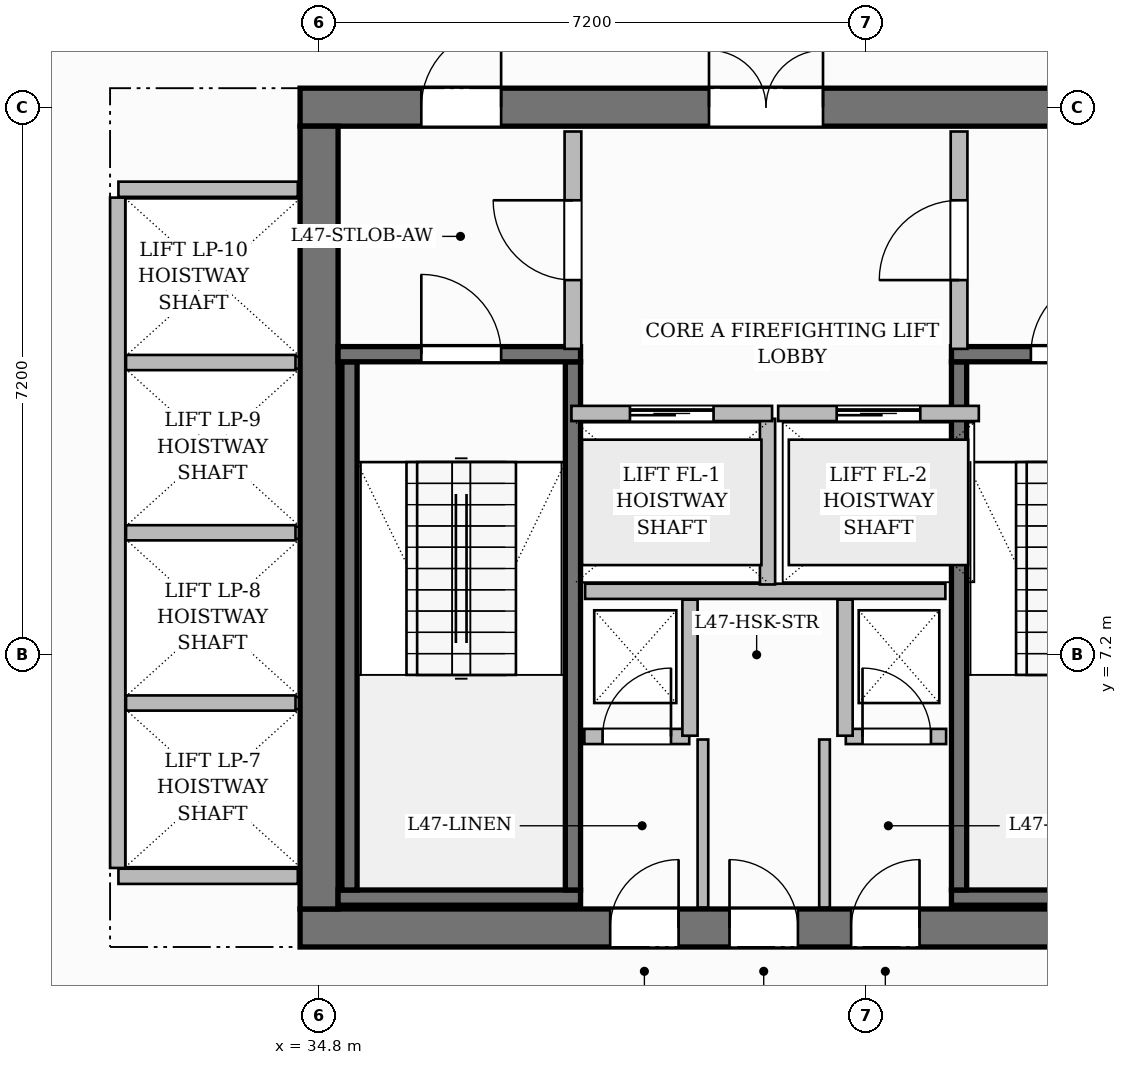
"""IFC4 building model, lengths in metres.
Left out: names, types, materials, properties, quantities, classifications, styles, units other than length and angle.
Written with IfcOpenShell. Run it as: python <this file> out.ifc"""

import sys

from ifc_helpers import new_model, si_unit, direction, frame, frame_2d, origin, place, context, subcontext, project, spatial, rectangle, extrude, source, transform, mapped, element, fill, save


model = new_model("IFC4")
c1 = context("Model", 3, precision=1e-05, world=origin(), true_north=direction((0.0, 1.0)))
c2 = subcontext(c1, "Body", "Model", "MODEL_VIEW")
j1 = project(units=[si_unit("LENGTHUNIT", "METRE"), si_unit("PLANEANGLEUNIT", "RADIAN")], contexts=[c1])
p1 = place(None, origin())
s1 = spatial("IfcSite", under=j1, at=p1, CompositionType="ELEMENT")
p2 = place(p1, origin())
s2 = spatial("IfcBuilding", under=s1, at=p2, CompositionType="ELEMENT")
p3 = place(p2, frame((0.0, 0.0, 188.8)))
s3 = spatial("IfcBuildingStorey", under=s2, at=p3, CompositionType="ELEMENT", Elevation=188.8)
p4 = place(p3, frame((34.55, 3.6, 0.0), z_axis=(0.0, 0.0, 1.0), x_axis=(1.0, 0.0, 0.0)))
e1 = element("IfcWall", 1, at=p4, inside=s3, PredefinedType="SHEAR", context=c2, shape_type="SweptSolid", body=[
    extrude(rectangle(XDim=15.5, YDim=0.5, at=frame_2d((7.75, 0.0))), origin(), (0.0, 0.0, 1.0), 3.85),
])
p5 = place(p4, frame((4.08, 0.0, 0.0)))
e2 = element("IfcOpeningElement", 2, at=p5, cuts=e1, PredefinedType="OPENING", context=c2, shape_type="SweptSolid", body=[
    extrude(rectangle(XDim=0.9, YDim=2.1, at=frame_2d((0.45, 1.05))), frame((0.0, 0.26, 0.0), z_axis=(0.0, -1.0, 0.0), x_axis=(1.0, 0.0, 0.0)), (0.0, 0.0, 1.0), 0.52),
])
p6 = place(p4, frame((5.65, 0.0, 0.0)))
e3 = element("IfcOpeningElement", 3, at=p6, cuts=e1, PredefinedType="OPENING", context=c2, shape_type="SweptSolid", body=[
    extrude(rectangle(XDim=0.9, YDim=2.1, at=frame_2d((0.45, 1.05))), frame((0.0, 0.26, 0.0), z_axis=(0.0, -1.0, 0.0), x_axis=(1.0, 0.0, 0.0)), (0.0, 0.0, 1.0), 0.52),
])
p7 = place(p4, frame((7.25, 0.0, 0.0)))
e4 = element("IfcOpeningElement", 4, at=p7, cuts=e1, PredefinedType="OPENING", context=c2, shape_type="SweptSolid", body=[
    extrude(rectangle(XDim=0.9, YDim=2.1, at=frame_2d((0.45, 1.05))), frame((0.0, 0.26, 0.0), z_axis=(0.0, -1.0, 0.0), x_axis=(1.0, 0.0, 0.0)), (0.0, 0.0, 1.0), 0.52),
])
p8 = place(p3, frame((34.55, 14.4, 0.0), z_axis=(0.0, 0.0, 1.0), x_axis=(1.0, 0.0, 0.0)))
e5 = element("IfcWall", 5, at=p8, inside=s3, PredefinedType="SHEAR", context=c2, shape_type="SweptSolid", body=[
    extrude(rectangle(XDim=15.5, YDim=0.5, at=frame_2d((7.75, 0.0))), origin(), (0.0, 0.0, 1.0), 3.85),
])
p9 = place(p8, frame((5.38, 0.0, 0.0)))
e6 = element("IfcOpeningElement", 6, at=p9, cuts=e5, PredefinedType="OPENING", context=c2, shape_type="SweptSolid", body=[
    extrude(rectangle(XDim=1.5, YDim=2.2, at=frame_2d((0.75, 1.1))), frame((0.0, 0.26, 0.0), z_axis=(0.0, -1.0, 0.0), x_axis=(1.0, 0.0, 0.0)), (0.0, 0.0, 1.0), 0.52),
])
p10 = place(p8, frame((1.595, 0.0, 0.0)))
e7 = element("IfcOpeningElement", 7, at=p10, cuts=e5, PredefinedType="OPENING", context=c2, shape_type="SweptSolid", body=[
    extrude(rectangle(XDim=1.05, YDim=2.15, at=frame_2d((0.525, 1.075))), frame((0.0, 0.26, 0.0), z_axis=(0.0, -1.0, 0.0), x_axis=(1.0, 0.0, 0.0)), (0.0, 0.0, 1.0), 0.52),
])
p11 = place(p8, frame((11.225, 0.0, 0.0)))
e8 = element("IfcOpeningElement", 8, at=p11, cuts=e5, PredefinedType="OPENING", context=c2, shape_type="SweptSolid", body=[
    extrude(rectangle(XDim=1.05, YDim=2.15, at=frame_2d((0.525, 1.075))), frame((0.0, 0.26, 0.0), z_axis=(0.0, -1.0, 0.0), x_axis=(1.0, 0.0, 0.0)), (0.0, 0.0, 1.0), 0.52),
])
p12 = place(p3, frame((34.8, 3.85, 0.0), z_axis=(0.0, 0.0, 1.0), x_axis=(0.0, 1.0, 0.0)))
e9 = element("IfcWall", 9, at=p12, inside=s3, PredefinedType="SHEAR", context=c2, shape_type="SweptSolid", body=[
    extrude(rectangle(XDim=10.3, YDim=0.5, at=frame_2d((5.15, 0.0))), origin(), (0.0, 0.0, 1.0), 3.85),
])
p13 = place(p3, frame((35.05, 4.0, 0.0), z_axis=(0.0, 0.0, 1.0), x_axis=(1.0, 0.0, 0.0)))
e10 = element("IfcWall", 10, at=p13, inside=s3, PredefinedType="SHEAR", context=c2, shape_type="SweptSolid", body=[
    extrude(rectangle(XDim=3.19, YDim=0.2, at=frame_2d((1.595, 0.0))), origin(), (0.0, 0.0, 1.0), 3.85),
])
for number, where, z_axis, x_axis in (
    (11, (35.2, 4.1, 0.0), (0.0, 0.0, 1.0), (0.0, 1.0, 0.0)),
    (12, (38.14, 4.1, 0.0), (0.0, 0.0, 1.0), (0.0, 1.0, 0.0)),
):
    element("IfcWall", number, at=place(p3, frame(where, z_axis=z_axis, x_axis=x_axis)), inside=s3, PredefinedType="SHEAR", context=c2, shape_type="SweptSolid", body=[
        extrude(rectangle(XDim=6.95, YDim=0.2, at=frame_2d((3.475, 0.0))), origin(), (0.0, 0.0, 1.0), 3.85),
    ])
p14 = place(p3, frame((35.05, 11.15, 0.0), z_axis=(0.0, 0.0, 1.0), x_axis=(1.0, 0.0, 0.0)))
e13 = element("IfcWall", 13, at=p14, inside=s3, PredefinedType="SHEAR", context=c2, shape_type="SweptSolid", body=[
    extrude(rectangle(XDim=3.19, YDim=0.2, at=frame_2d((1.595, 0.0))), origin(), (0.0, 0.0, 1.0), 3.85),
])
p15 = place(p14, frame((1.095, 0.0, 0.0)))
e14 = element("IfcOpeningElement", 14, at=p15, cuts=e13, PredefinedType="OPENING", context=c2, shape_type="SweptSolid", body=[
    extrude(rectangle(XDim=1.05, YDim=2.2, at=frame_2d((0.525, 1.1))), frame((0.0, 0.11, 0.0), z_axis=(0.0, -1.0, 0.0), x_axis=(1.0, 0.0, 0.0)), (0.0, 0.0, 1.0), 0.22),
])
p16 = place(p3, frame((43.12, 4.0, 0.0), z_axis=(0.0, 0.0, 1.0), x_axis=(1.0, 0.0, 0.0)))
e15 = element("IfcWall", 15, at=p16, inside=s3, PredefinedType="SHEAR", context=c2, shape_type="SweptSolid", body=[
    extrude(rectangle(XDim=6.43, YDim=0.2, at=frame_2d((3.215, 0.0))), origin(), (0.0, 0.0, 1.0), 3.85),
])
p17 = place(p3, frame((43.22, 4.1, 0.0), z_axis=(0.0, 0.0, 1.0), x_axis=(0.0, 1.0, 0.0)))
e16 = element("IfcWall", 16, at=p17, inside=s3, PredefinedType="SHEAR", context=c2, shape_type="SweptSolid", body=[
    extrude(rectangle(XDim=6.95, YDim=0.2, at=frame_2d((3.475, 0.0))), origin(), (0.0, 0.0, 1.0), 3.85),
])
p18 = place(p3, frame((43.12, 11.15, 0.0), z_axis=(0.0, 0.0, 1.0), x_axis=(1.0, 0.0, 0.0)))
e17 = element("IfcWall", 17, at=p18, inside=s3, PredefinedType="SHEAR", context=c2, shape_type="SweptSolid", body=[
    extrude(rectangle(XDim=6.43, YDim=0.2, at=frame_2d((3.215, 0.0))), origin(), (0.0, 0.0, 1.0), 3.85),
])
p19 = place(p18, frame((1.045, 0.0, 0.0)))
e18 = element("IfcOpeningElement", 18, at=p19, cuts=e17, PredefinedType="OPENING", context=c2, shape_type="SweptSolid", body=[
    extrude(rectangle(XDim=1.05, YDim=2.2, at=frame_2d((0.525, 1.1))), frame((0.0, 0.11, 0.0), z_axis=(0.0, -1.0, 0.0), x_axis=(1.0, 0.0, 0.0)), (0.0, 0.0, 1.0), 0.22),
])
p20 = place(p18, frame((4.125, 0.0, 0.0)))
e19 = element("IfcOpeningElement", 19, at=p20, cuts=e17, PredefinedType="OPENING", context=c2, shape_type="SweptSolid", body=[
    extrude(rectangle(XDim=1.05, YDim=2.2, at=frame_2d((0.525, 1.1))), frame((0.0, 0.11, 0.0), z_axis=(0.0, -1.0, 0.0), x_axis=(1.0, 0.0, 0.0)), (0.0, 0.0, 1.0), 0.22),
])
p21 = place(p3, frame((38.3, 8.03, 0.0), z_axis=(0.0, 0.0, 1.0), x_axis=(1.0, 0.0, 0.0)))
e20 = element("IfcWall", 20, at=p21, inside=s3, PredefinedType="PARTITIONING", context=c2, shape_type="SweptSolid", body=[
    extrude(rectangle(XDim=4.74, YDim=0.2, at=frame_2d((2.37, 0.0))), origin(), (0.0, 0.0, 1.0), 3.6),
])
p22 = place(p3, frame((40.7, 8.12, 0.0), z_axis=(0.0, 0.0, 1.0), x_axis=(0.0, 1.0, 0.0)))
e21 = element("IfcWall", 21, at=p22, inside=s3, PredefinedType="PARTITIONING", context=c2, shape_type="SweptSolid", body=[
    extrude(rectangle(XDim=2.18, YDim=0.2, at=frame_2d((1.09, 0.0))), origin(), (0.0, 0.0, 1.0), 3.6),
])
p23 = place(p3, frame((38.14, 11.22, 0.0), z_axis=(0.0, 0.0, 1.0), x_axis=(0.0, 1.0, 0.0)))
e22 = element("IfcWall", 22, at=p23, inside=s3, PredefinedType="PARTITIONING", context=c2, shape_type="SweptSolid", body=[
    extrude(rectangle(XDim=2.86, YDim=0.22, at=frame_2d((1.43, 0.0))), origin(), (0.0, 0.0, 1.0), 3.6),
])
p24 = place(p23, frame((0.905, 0.0, 0.0)))
e23 = element("IfcOpeningElement", 23, at=p24, cuts=e22, PredefinedType="OPENING", context=c2, shape_type="SweptSolid", body=[
    extrude(rectangle(XDim=1.05, YDim=2.15, at=frame_2d((0.525, 1.075))), frame((0.0, 0.12, 0.0), z_axis=(0.0, -1.0, 0.0), x_axis=(1.0, 0.0, 0.0)), (0.0, 0.0, 1.0), 0.24),
])
p25 = place(p3, frame((43.22, 11.22, 0.0), z_axis=(0.0, 0.0, 1.0), x_axis=(0.0, 1.0, 0.0)))
e24 = element("IfcWall", 24, at=p25, inside=s3, PredefinedType="PARTITIONING", context=c2, shape_type="SweptSolid", body=[
    extrude(rectangle(XDim=2.86, YDim=0.22, at=frame_2d((1.43, 0.0))), origin(), (0.0, 0.0, 1.0), 3.6),
])
p26 = place(p25, frame((0.905, 0.0, 0.0)))
e25 = element("IfcOpeningElement", 25, at=p26, cuts=e24, PredefinedType="OPENING", context=c2, shape_type="SweptSolid", body=[
    extrude(rectangle(XDim=1.05, YDim=2.15, at=frame_2d((0.525, 1.075))), frame((0.0, 0.12, 0.0), z_axis=(0.0, -1.0, 0.0), x_axis=(1.0, 0.0, 0.0)), (0.0, 0.0, 1.0), 0.24),
])
p27 = place(p3, frame((38.29, 6.12, 0.0), z_axis=(0.0, 0.0, 1.0), x_axis=(1.0, 0.0, 0.0)))
e26 = element("IfcWall", 26, at=p27, inside=s3, PredefinedType="PARTITIONING", context=c2, shape_type="SweptSolid", body=[
    extrude(rectangle(XDim=1.38, YDim=0.2, at=frame_2d((0.69, 0.0))), origin(), (0.0, 0.0, 1.0), 3.6),
])
p28 = place(p27, frame((0.24, 0.0, 0.0)))
e27 = element("IfcOpeningElement", 27, at=p28, cuts=e26, PredefinedType="OPENING", context=c2, shape_type="SweptSolid", body=[
    extrude(rectangle(XDim=0.9, YDim=2.1, at=frame_2d((0.45, 1.05))), frame((0.0, 0.11, 0.0), z_axis=(0.0, -1.0, 0.0), x_axis=(1.0, 0.0, 0.0)), (0.0, 0.0, 1.0), 0.22),
])
p29 = place(p3, frame((39.68, 6.13, 0.0), z_axis=(0.0, 0.0, 1.0), x_axis=(0.0, 1.0, 0.0)))
e28 = element("IfcWall", 28, at=p29, inside=s3, PredefinedType="PARTITIONING", context=c2, shape_type="SweptSolid", body=[
    extrude(rectangle(XDim=1.79, YDim=0.2, at=frame_2d((0.895, 0.0))), origin(), (0.0, 0.0, 1.0), 3.6),
])
p30 = place(p3, frame((41.73, 6.12, 0.0), z_axis=(0.0, 0.0, 1.0), x_axis=(1.0, 0.0, 0.0)))
e29 = element("IfcWall", 29, at=p30, inside=s3, PredefinedType="PARTITIONING", context=c2, shape_type="SweptSolid", body=[
    extrude(rectangle(XDim=1.32, YDim=0.2, at=frame_2d((0.66, 0.0))), origin(), (0.0, 0.0, 1.0), 3.6),
])
p31 = place(p30, frame((0.22, 0.0, 0.0)))
e30 = element("IfcOpeningElement", 30, at=p31, cuts=e29, PredefinedType="OPENING", context=c2, shape_type="SweptSolid", body=[
    extrude(rectangle(XDim=0.9, YDim=2.1, at=frame_2d((0.45, 1.05))), frame((0.0, 0.11, 0.0), z_axis=(0.0, -1.0, 0.0), x_axis=(1.0, 0.0, 0.0)), (0.0, 0.0, 1.0), 0.22),
])
p32 = place(p3, frame((41.72, 6.13, 0.0), z_axis=(0.0, 0.0, 1.0), x_axis=(0.0, 1.0, 0.0)))
e31 = element("IfcWall", 31, at=p32, inside=s3, PredefinedType="PARTITIONING", context=c2, shape_type="SweptSolid", body=[
    extrude(rectangle(XDim=1.79, YDim=0.2, at=frame_2d((0.895, 0.0))), origin(), (0.0, 0.0, 1.0), 3.6),
])
for number, where, z_axis, x_axis in (
    (32, (39.85, 3.87, 0.0), (0.0, 0.0, 1.0), (0.0, 1.0, 0.0)),
    (33, (41.45, 3.87, 0.0), (0.0, 0.0, 1.0), (0.0, 1.0, 0.0)),
):
    element("IfcWall", number, at=place(p3, frame(where, z_axis=z_axis, x_axis=x_axis)), inside=s3, PredefinedType="PARTITIONING", context=c2, shape_type="SweptSolid", body=[
        extrude(rectangle(XDim=2.21, YDim=0.14, at=frame_2d((1.105, 0.0))), origin(), (0.0, 0.0, 1.0), 3.6),
    ])
for number, where, z_axis, x_axis in (
    (34, (32.16, 4.28, 0.0), (0.0, 0.0, 1.0), (1.0, 0.0, 0.0)),
    (35, (32.16, 13.32, 0.0), (0.0, 0.0, 1.0), (1.0, 0.0, 0.0)),
):
    element("IfcWall", number, at=place(p3, frame(where, z_axis=z_axis, x_axis=x_axis)), inside=s3, PredefinedType="PARTITIONING", context=c2, shape_type="SweptSolid", body=[
        extrude(rectangle(XDim=2.36, YDim=0.2, at=frame_2d((1.18, 0.0))), origin(), (0.0, 0.0, 1.0), 3.6),
    ])
p33 = place(p3, frame((32.15, 4.39, 0.0), z_axis=(0.0, 0.0, 1.0), x_axis=(0.0, 1.0, 0.0)))
e36 = element("IfcWall", 36, at=p33, inside=s3, PredefinedType="PARTITIONING", context=c2, shape_type="SweptSolid", body=[
    extrude(rectangle(XDim=8.82, YDim=0.2, at=frame_2d((4.41, 0.0))), origin(), (0.0, 0.0, 1.0), 3.6),
])
for number, where, z_axis, x_axis in (
    (37, (32.26, 6.56, 0.0), (0.0, 0.0, 1.0), (1.0, 0.0, 0.0)),
    (38, (32.26, 8.8, 0.0), (0.0, 0.0, 1.0), (1.0, 0.0, 0.0)),
    (39, (32.26, 11.04, 0.0), (0.0, 0.0, 1.0), (1.0, 0.0, 0.0)),
):
    element("IfcWall", number, at=place(p3, frame(where, z_axis=z_axis, x_axis=x_axis)), inside=s3, PredefinedType="PARTITIONING", context=c2, shape_type="SweptSolid", body=[
        extrude(rectangle(XDim=2.23, YDim=0.2, at=frame_2d((1.115, 0.0))), origin(), (0.0, 0.0, 1.0), 3.6),
    ])
p34 = place(p3, frame((38.12, 10.37, 0.0), z_axis=(0.0, 0.0, 1.0), x_axis=(1.0, 0.0, 0.0)))
e40 = element("IfcWall", 40, at=p34, inside=s3, PredefinedType="PARTITIONING", context=c2, shape_type="SweptSolid", body=[
    extrude(rectangle(XDim=2.64, YDim=0.2, at=frame_2d((1.32, 0.0))), origin(), (0.0, 0.0, 1.0), 3.6),
])
p35 = place(p34, frame((0.77, 0.0, 0.0)))
e41 = element("IfcOpeningElement", 41, at=p35, cuts=e40, PredefinedType="OPENING", context=c2, shape_type="SweptSolid", body=[
    extrude(rectangle(XDim=1.1, YDim=2.2, at=frame_2d((0.55, 1.1))), frame((0.0, 0.11, 0.0), z_axis=(0.0, -1.0, 0.0), x_axis=(1.0, 0.0, 0.0)), (0.0, 0.0, 1.0), 0.22),
])
p36 = place(p3, frame((40.84, 10.37, 0.0), z_axis=(0.0, 0.0, 1.0), x_axis=(1.0, 0.0, 0.0)))
e42 = element("IfcWall", 42, at=p36, inside=s3, PredefinedType="PARTITIONING", context=c2, shape_type="SweptSolid", body=[
    extrude(rectangle(XDim=2.64, YDim=0.2, at=frame_2d((1.32, 0.0))), origin(), (0.0, 0.0, 1.0), 3.6),
])
p37 = place(p36, frame((0.77, 0.0, 0.0)))
e43 = element("IfcOpeningElement", 43, at=p37, cuts=e42, PredefinedType="OPENING", context=c2, shape_type="SweptSolid", body=[
    extrude(rectangle(XDim=1.1, YDim=2.2, at=frame_2d((0.55, 1.1))), frame((0.0, 0.11, 0.0), z_axis=(0.0, -1.0, 0.0), x_axis=(1.0, 0.0, 0.0)), (0.0, 0.0, 1.0), 0.22),
])
m1 = source(origin(), c2, "Body", "SweptSolid", [
    extrude(rectangle(XDim=1.05, YDim=2.2, at=frame_2d((0.525, 1.1))), frame((0.0, 0.025, 0.0), z_axis=(0.0, -1.0, 0.0), x_axis=(1.0, 0.0, 0.0)), (0.0, 0.0, 1.0), 0.05),
])
p38 = place(p15, origin())
e44 = element("IfcDoor", 44, at=p38, inside=s3, OperationType="SINGLE_SWING_LEFT", PredefinedType="DOOR", context=c2, shape_type="MappedRepresentation", body=[
    mapped(m1, transform((0.0, 0.0, 0.0), scale=1.0)),
])
fill(e14, e44)
p39 = place(p19, origin())
e45 = element("IfcDoor", 45, at=p39, inside=s3, OperationType="SINGLE_SWING_RIGHT", PredefinedType="DOOR", context=c2, shape_type="MappedRepresentation", body=[
    mapped(m1, transform((0.0, 0.0, 0.0), scale=1.0)),
])
fill(e18, e45)
m2 = source(origin(), c2, "Body", "SweptSolid", [
    extrude(rectangle(XDim=1.05, YDim=2.15, at=frame_2d((0.525, 1.075))), frame((0.0, 0.025, 0.0), z_axis=(0.0, -1.0, 0.0), x_axis=(1.0, 0.0, 0.0)), (0.0, 0.0, 1.0), 0.05),
])
p40 = place(p24, origin())
e46 = element("IfcDoor", 46, at=p40, inside=s3, OperationType="SINGLE_SWING_RIGHT", PredefinedType="DOOR", context=c2, shape_type="MappedRepresentation", body=[
    mapped(m2, transform((0.0, 0.0, 0.0), scale=1.0)),
])
fill(e23, e46)
p41 = place(p26, origin())
e47 = element("IfcDoor", 47, at=p41, inside=s3, OperationType="SINGLE_SWING_LEFT", PredefinedType="DOOR", context=c2, shape_type="MappedRepresentation", body=[
    mapped(m2, transform((0.0, 0.0, 0.0), scale=1.0)),
])
fill(e25, e47)
m3 = source(origin(), c2, "Body", "SweptSolid", [
    extrude(rectangle(XDim=1.5, YDim=2.2, at=frame_2d((0.75, 1.1))), frame((0.0, 0.025, 0.0), z_axis=(0.0, -1.0, 0.0), x_axis=(1.0, 0.0, 0.0)), (0.0, 0.0, 1.0), 0.05),
])
p42 = place(p9, origin())
e48 = element("IfcDoor", 48, at=p42, inside=s3, OperationType="DOUBLE_DOOR_SINGLE_SWING", PredefinedType="DOOR", context=c2, shape_type="MappedRepresentation", body=[
    mapped(m3, transform((0.0, 0.0, 0.0), scale=1.0)),
])
fill(e6, e48)
p43 = place(p10, origin())
e49 = element("IfcDoor", 49, at=p43, inside=s3, OperationType="SINGLE_SWING_RIGHT", PredefinedType="DOOR", context=c2, shape_type="MappedRepresentation", body=[
    mapped(m2, transform((0.0, 0.0, 0.0), scale=1.0)),
])
fill(e7, e49)
m4 = source(origin(), c2, "Body", "SweptSolid", [
    extrude(rectangle(XDim=0.9, YDim=2.1, at=frame_2d((0.45, 1.05))), frame((0.0, 0.025, 0.0), z_axis=(0.0, -1.0, 0.0), x_axis=(1.0, 0.0, 0.0)), (0.0, 0.0, 1.0), 0.05),
])
p44 = place(p28, origin())
e50 = element("IfcDoor", 50, at=p44, inside=s3, OperationType="SINGLE_SWING_RIGHT", PredefinedType="DOOR", context=c2, shape_type="MappedRepresentation", body=[
    mapped(m4, transform((0.0, 0.0, 0.0), scale=1.0)),
])
fill(e27, e50)
p45 = place(p31, origin())
e51 = element("IfcDoor", 51, at=p45, inside=s3, OperationType="SINGLE_SWING_LEFT", PredefinedType="DOOR", context=c2, shape_type="MappedRepresentation", body=[
    mapped(m4, transform((0.0, 0.0, 0.0), scale=1.0)),
])
fill(e30, e51)
p46 = place(p5, origin())
e52 = element("IfcDoor", 52, at=p46, inside=s3, OperationType="SINGLE_SWING_RIGHT", PredefinedType="DOOR", context=c2, shape_type="MappedRepresentation", body=[
    mapped(m4, transform((0.0, 0.0, 0.0), scale=1.0)),
])
fill(e2, e52)
p47 = place(p6, origin())
e53 = element("IfcDoor", 53, at=p47, inside=s3, OperationType="SINGLE_SWING_LEFT", PredefinedType="DOOR", context=c2, shape_type="MappedRepresentation", body=[
    mapped(m4, transform((0.0, 0.0, 0.0), scale=1.0)),
])
fill(e3, e53)
p48 = place(p7, origin())
e54 = element("IfcDoor", 54, at=p48, inside=s3, OperationType="SINGLE_SWING_RIGHT", PredefinedType="DOOR", context=c2, shape_type="MappedRepresentation", body=[
    mapped(m4, transform((0.0, 0.0, 0.0), scale=1.0)),
])
fill(e4, e54)
m5 = source(origin(), c2, "Body", "SweptSolid", [
    extrude(rectangle(XDim=1.1, YDim=2.2, at=frame_2d((0.55, 1.1))), frame((0.0, 0.025, 0.0), z_axis=(0.0, -1.0, 0.0), x_axis=(1.0, 0.0, 0.0)), (0.0, 0.0, 1.0), 0.05),
])
p49 = place(p35, origin())
e55 = element("IfcDoor", 55, at=p49, inside=s3, OperationType="SLIDING_TO_LEFT", PredefinedType="DOOR", context=c2, shape_type="MappedRepresentation", body=[
    mapped(m5, transform((0.0, 0.0, 0.0), scale=1.0)),
])
fill(e41, e55)
p50 = place(p37, origin())
e56 = element("IfcDoor", 56, at=p50, inside=s3, OperationType="SLIDING_TO_LEFT", PredefinedType="DOOR", context=c2, shape_type="MappedRepresentation", body=[
    mapped(m5, transform((0.0, 0.0, 0.0), scale=1.0)),
])
fill(e43, e56)
save(model, sys.argv[1])
